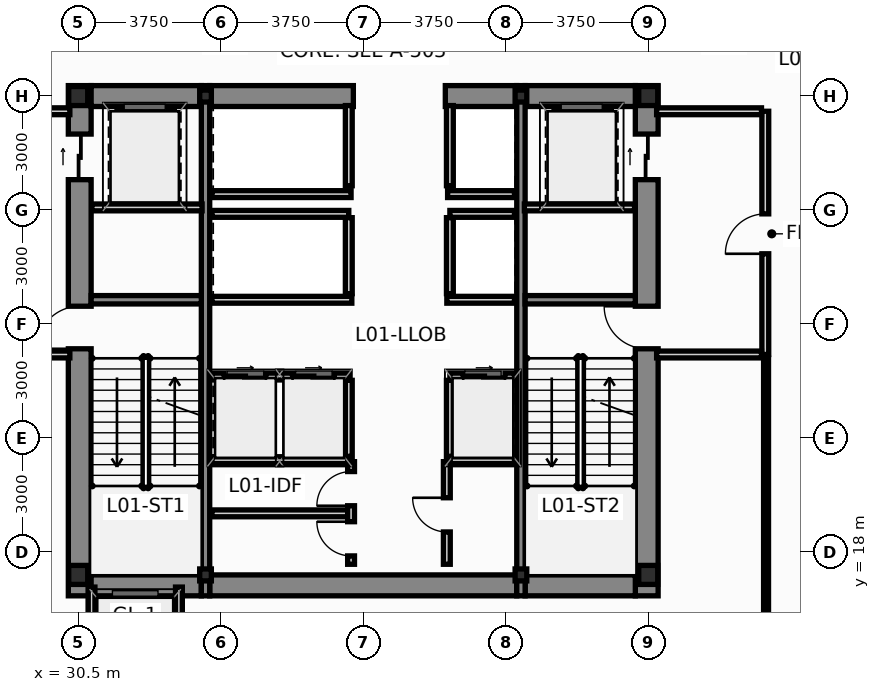
"""IFC4 building model, lengths in metres.
Left out: names, types, materials, properties, quantities, classifications, styles, units other than length and angle.
Written with IfcOpenShell. Run it as: python <this file> out.ifc"""

import sys

from ifc_helpers import new_model, si_unit, direction, frame, frame_2d, origin, origin_2d, place, context, subcontext, project, spatial, rectangle, i_section, extrude, source, transform, mapped, element, fill, save


model = new_model("IFC4")
c1 = context("Model", 3, precision=1e-05, world=origin(), true_north=direction((0.0, 1.0)))
c2 = subcontext(c1, "Body", "Model", "MODEL_VIEW")
j1 = project(units=[si_unit("LENGTHUNIT", "METRE"), si_unit("PLANEANGLEUNIT", "RADIAN")], contexts=[c1])
p1 = place(None, origin())
s1 = spatial("IfcSite", under=j1, at=p1, CompositionType="ELEMENT")
p2 = place(p1, origin())
s2 = spatial("IfcBuilding", under=s1, at=p2, CompositionType="ELEMENT")
p3 = place(p2, frame((0.0, 0.0, 5.4)))
s3 = spatial("IfcBuildingStorey", under=s2, at=p3, CompositionType="ELEMENT", Elevation=5.4)
m1 = source(origin(), c2, "Body", "SweptSolid", [
    extrude(i_section(OverallWidth=0.5, OverallDepth=0.5, WebThickness=0.028, FlangeThickness=0.04, at=origin_2d()), origin(), (0.0, 0.0, 1.0), 4.8),
])
for number, where, z_axis, x_axis in (
    (1, (30.5, 17.4, 0.0), (0.0, 0.0, 1.0), (1.0, 0.0, 0.0)),
    (2, (45.5, 17.4, 0.0), (0.0, 0.0, 1.0), (1.0, 0.0, 0.0)),
    (3, (45.5, 30.0, 0.0), (0.0, 0.0, 1.0), (1.0, 0.0, 0.0)),
    (4, (30.5, 30.0, 0.0), (0.0, 0.0, 1.0), (1.0, 0.0, 0.0)),
):
    element("IfcColumn", number, at=place(p3, frame(where, z_axis=z_axis, x_axis=x_axis)), inside=s3, PredefinedType="COLUMN", context=c2, shape_type="MappedRepresentation", body=[
        mapped(m1, transform((0.0, 0.0, 0.0), scale=1.0)),
    ])
m2 = source(origin(), c2, "Body", "SweptSolid", [
    extrude(i_section(OverallWidth=0.307, OverallDepth=0.315, WebThickness=0.012, FlangeThickness=0.019, at=origin_2d()), origin(), (0.0, 0.0, 1.0), 4.8),
])
for number, where, z_axis, x_axis in (
    (5, (33.85, 17.4, 0.0), (0.0, 0.0, 1.0), (1.0, 0.0, 0.0)),
    (6, (42.15, 17.4, 0.0), (0.0, 0.0, 1.0), (1.0, 0.0, 0.0)),
    (7, (33.85, 30.0, 0.0), (0.0, 0.0, 1.0), (1.0, 0.0, 0.0)),
    (8, (42.15, 30.0, 0.0), (0.0, 0.0, 1.0), (1.0, 0.0, 0.0)),
):
    element("IfcColumn", number, at=place(p3, frame(where, z_axis=z_axis, x_axis=x_axis)), inside=s3, PredefinedType="COLUMN", context=c2, shape_type="MappedRepresentation", body=[
        mapped(m2, transform((0.0, 0.0, 0.0), scale=1.0)),
    ])
p4 = place(p3, frame((30.54, 16.85, 0.0), z_axis=(0.0, 0.0, 1.0), x_axis=(0.0, 1.0, 0.0)))
e9 = element("IfcWall", 9, at=p4, inside=s3, PredefinedType="SHEAR", context=c2, shape_type="SweptSolid", body=[
    extrude(rectangle(XDim=13.425, YDim=0.6, at=frame_2d((6.712, 0.0))), origin(), (0.0, 0.0, 1.0), 4.8),
])
p5 = place(p4, frame((6.5, 0.0, 0.0)))
e10 = element("IfcOpeningElement", 10, at=p5, cuts=e9, PredefinedType="OPENING", context=c2, shape_type="SweptSolid", body=[
    extrude(rectangle(XDim=1.12, YDim=2.15, at=frame_2d((0.56, 1.075))), frame((0.0, 0.312, 0.0), z_axis=(0.0, -1.0, 0.0), x_axis=(1.0, 0.0, 0.0)), (0.0, 0.0, 1.0), 0.624),
])
p6 = place(p4, frame((10.95, 0.0, 0.0)))
e11 = element("IfcOpeningElement", 11, at=p6, cuts=e9, PredefinedType="OPENING", context=c2, shape_type="SweptSolid", body=[
    extrude(rectangle(XDim=1.2, YDim=2.2, at=frame_2d((0.6, 1.1))), frame((0.0, 0.312, 0.0), z_axis=(0.0, -1.0, 0.0), x_axis=(1.0, 0.0, 0.0)), (0.0, 0.0, 1.0), 0.624),
])
p7 = place(p3, frame((45.46, 16.85, 0.0), z_axis=(0.0, 0.0, 1.0), x_axis=(0.0, 1.0, 0.0)))
e12 = element("IfcWall", 12, at=p7, inside=s3, PredefinedType="SHEAR", context=c2, shape_type="SweptSolid", body=[
    extrude(rectangle(XDim=13.425, YDim=0.6, at=frame_2d((6.712, 0.0))), origin(), (0.0, 0.0, 1.0), 4.8),
])
p8 = place(p7, frame((6.5, 0.0, 0.0)))
e13 = element("IfcOpeningElement", 13, at=p8, cuts=e12, PredefinedType="OPENING", context=c2, shape_type="SweptSolid", body=[
    extrude(rectangle(XDim=1.12, YDim=2.15, at=frame_2d((0.56, 1.075))), frame((0.0, 0.312, 0.0), z_axis=(0.0, -1.0, 0.0), x_axis=(1.0, 0.0, 0.0)), (0.0, 0.0, 1.0), 0.624),
])
p9 = place(p7, frame((10.95, 0.0, 0.0)))
e14 = element("IfcOpeningElement", 14, at=p9, cuts=e12, PredefinedType="OPENING", context=c2, shape_type="SweptSolid", body=[
    extrude(rectangle(XDim=1.2, YDim=2.2, at=frame_2d((0.6, 1.1))), frame((0.0, 0.312, 0.0), z_axis=(0.0, -1.0, 0.0), x_axis=(1.0, 0.0, 0.0)), (0.0, 0.0, 1.0), 0.624),
])
p10 = place(p3, frame((30.84, 17.125, 0.0), z_axis=(0.0, 0.0, 1.0), x_axis=(1.0, 0.0, 0.0)))
e15 = element("IfcWall", 15, at=p10, inside=s3, PredefinedType="SHEAR", context=c2, shape_type="SweptSolid", body=[
    extrude(rectangle(XDim=2.9, YDim=0.55, at=frame_2d((1.45, 0.0))), origin(), (0.0, 0.0, 1.0), 4.8),
])
p11 = place(p3, frame((33.96, 17.125, 0.0), z_axis=(0.0, 0.0, 1.0), x_axis=(1.0, 0.0, 0.0)))
e16 = element("IfcWall", 16, at=p11, inside=s3, PredefinedType="SHEAR", context=c2, shape_type="SweptSolid", body=[
    extrude(rectangle(XDim=8.08, YDim=0.55, at=frame_2d((4.04, 0.0))), origin(), (0.0, 0.0, 1.0), 4.8),
])
for number, where, z_axis, x_axis in (
    (17, (42.26, 17.125, 0.0), (0.0, 0.0, 1.0), (1.0, 0.0, 0.0)),
    (18, (30.84, 30.0, 0.0), (0.0, 0.0, 1.0), (1.0, 0.0, 0.0)),
):
    element("IfcWall", number, at=place(p3, frame(where, z_axis=z_axis, x_axis=x_axis)), inside=s3, PredefinedType="SHEAR", context=c2, shape_type="SweptSolid", body=[
        extrude(rectangle(XDim=2.9, YDim=0.55, at=frame_2d((1.45, 0.0))), origin(), (0.0, 0.0, 1.0), 4.8),
    ])
p12 = place(p3, frame((33.96, 30.0, 0.0), z_axis=(0.0, 0.0, 1.0), x_axis=(1.0, 0.0, 0.0)))
e19 = element("IfcWall", 19, at=p12, inside=s3, PredefinedType="SHEAR", context=c2, shape_type="SweptSolid", body=[
    extrude(rectangle(XDim=3.78, YDim=0.55, at=frame_2d((1.89, 0.0))), origin(), (0.0, 0.0, 1.0), 4.8),
])
p13 = place(p3, frame((40.16, 30.0, 0.0), z_axis=(0.0, 0.0, 1.0), x_axis=(1.0, 0.0, 0.0)))
e20 = element("IfcWall", 20, at=p13, inside=s3, PredefinedType="SHEAR", context=c2, shape_type="SweptSolid", body=[
    extrude(rectangle(XDim=1.88, YDim=0.55, at=frame_2d((0.94, 0.0))), origin(), (0.0, 0.0, 1.0), 4.8),
])
p14 = place(p3, frame((42.26, 30.0, 0.0), z_axis=(0.0, 0.0, 1.0), x_axis=(1.0, 0.0, 0.0)))
e21 = element("IfcWall", 21, at=p14, inside=s3, PredefinedType="SHEAR", context=c2, shape_type="SweptSolid", body=[
    extrude(rectangle(XDim=2.9, YDim=0.55, at=frame_2d((1.45, 0.0))), origin(), (0.0, 0.0, 1.0), 4.8),
])
for number, where, z_axis, x_axis in (
    (22, (33.85, 16.85, 0.0), (0.0, 0.0, 1.0), (0.0, 1.0, 0.0)),
    (23, (42.15, 16.85, 0.0), (0.0, 0.0, 1.0), (0.0, 1.0, 0.0)),
):
    element("IfcWall", number, at=place(p3, frame(where, z_axis=z_axis, x_axis=x_axis)), inside=s3, PredefinedType="SHEAR", context=c2, shape_type="SweptSolid", body=[
        extrude(rectangle(XDim=13.425, YDim=0.22, at=frame_2d((6.712, 0.0))), origin(), (0.0, 0.0, 1.0), 4.8),
    ])
for number, where, z_axis, x_axis in (
    (24, (30.84, 24.64, 0.0), (0.0, 0.0, 1.0), (1.0, 0.0, 0.0)),
    (25, (42.26, 24.64, 0.0), (0.0, 0.0, 1.0), (1.0, 0.0, 0.0)),
):
    element("IfcWall", number, at=place(p3, frame(where, z_axis=z_axis, x_axis=x_axis)), inside=s3, PredefinedType="SHEAR", context=c2, shape_type="SweptSolid", body=[
        extrude(rectangle(XDim=2.9, YDim=0.22, at=frame_2d((1.45, 0.0))), origin(), (0.0, 0.0, 1.0), 4.8),
    ])
p15 = place(p3, frame((30.85, 14.42, 0.0), z_axis=(0.0, 0.0, 1.0), x_axis=(0.0, 1.0, 0.0)))
e26 = element("IfcWall", 26, at=p15, inside=s3, PredefinedType="PARTITIONING", context=c2, shape_type="SweptSolid", body=[
    extrude(rectangle(XDim=2.66, YDim=0.18, at=frame_2d((1.33, 0.0))), origin(), (0.0, 0.0, 1.0), 3.854),
])
p16 = place(p3, frame((33.15, 14.42, 0.0), z_axis=(0.0, 0.0, 1.0), x_axis=(0.0, 1.0, 0.0)))
e27 = element("IfcWall", 27, at=p16, inside=s3, PredefinedType="PARTITIONING", context=c2, shape_type="SweptSolid", body=[
    extrude(rectangle(XDim=2.66, YDim=0.18, at=frame_2d((1.33, 0.0))), origin(), (0.0, 0.0, 1.0), 4.48),
])
p17 = place(p3, frame((34.02, 22.62, 0.0), z_axis=(0.0, 0.0, 1.0), x_axis=(1.0, 0.0, 0.0)))
e28 = element("IfcWall", 28, at=p17, inside=s3, PredefinedType="PARTITIONING", context=c2, shape_type="SweptSolid", body=[
    extrude(rectangle(XDim=3.6, YDim=0.18, at=frame_2d((1.8, 0.0))), origin(), (0.0, 0.0, 1.0), 4.48),
])
p18 = place(p17, frame((0.32, 0.0, 0.0)))
e29 = element("IfcOpeningElement", 29, at=p18, cuts=e28, PredefinedType="OPENING", context=c2, shape_type="SweptSolid", body=[
    extrude(rectangle(XDim=1.1, YDim=2.2, at=frame_2d((0.55, 1.1))), frame((0.0, 0.102, 0.0), z_axis=(0.0, -1.0, 0.0), x_axis=(1.0, 0.0, 0.0)), (0.0, 0.0, 1.0), 0.204),
])
p19 = place(p17, frame((2.12, 0.0, 0.0)))
e30 = element("IfcOpeningElement", 30, at=p19, cuts=e28, PredefinedType="OPENING", context=c2, shape_type="SweptSolid", body=[
    extrude(rectangle(XDim=1.1, YDim=2.2, at=frame_2d((0.55, 1.1))), frame((0.0, 0.102, 0.0), z_axis=(0.0, -1.0, 0.0), x_axis=(1.0, 0.0, 0.0)), (0.0, 0.0, 1.0), 0.204),
])
p20 = place(p3, frame((40.28, 22.62, 0.0), z_axis=(0.0, 0.0, 1.0), x_axis=(1.0, 0.0, 0.0)))
e31 = element("IfcWall", 31, at=p20, inside=s3, PredefinedType="PARTITIONING", context=c2, shape_type="SweptSolid", body=[
    extrude(rectangle(XDim=1.7, YDim=0.18, at=frame_2d((0.85, 0.0))), origin(), (0.0, 0.0, 1.0), 4.48),
])
p21 = place(p20, frame((0.35, 0.0, 0.0)))
e32 = element("IfcOpeningElement", 32, at=p21, cuts=e31, PredefinedType="OPENING", context=c2, shape_type="SweptSolid", body=[
    extrude(rectangle(XDim=1.1, YDim=2.2, at=frame_2d((0.55, 1.1))), frame((0.0, 0.102, 0.0), z_axis=(0.0, -1.0, 0.0), x_axis=(1.0, 0.0, 0.0)), (0.0, 0.0, 1.0), 0.204),
])
for number, where, z_axis, x_axis in (
    (33, (37.62, 20.52, 0.0), (0.0, 0.0, 1.0), (0.0, 1.0, 0.0)),
    (34, (40.28, 20.52, 0.0), (0.0, 0.0, 1.0), (0.0, 1.0, 0.0)),
):
    element("IfcWall", number, at=place(p3, frame(where, z_axis=z_axis, x_axis=x_axis)), inside=s3, PredefinedType="PARTITIONING", context=c2, shape_type="SweptSolid", body=[
        extrude(rectangle(XDim=2.0, YDim=0.18, at=frame_2d((1.0, 0.0))), origin(), (0.0, 0.0, 1.0), 4.48),
    ])
p22 = place(p3, frame((34.02, 26.9, 0.0), z_axis=(0.0, 0.0, 1.0), x_axis=(1.0, 0.0, 0.0)))
e35 = element("IfcWall", 35, at=p22, inside=s3, PredefinedType="PARTITIONING", context=c2, shape_type="SweptSolid", body=[
    extrude(rectangle(XDim=3.6, YDim=0.18, at=frame_2d((1.8, 0.0))), origin(), (0.0, 0.0, 1.0), 4.48),
])
p23 = place(p3, frame((40.28, 26.9, 0.0), z_axis=(0.0, 0.0, 1.0), x_axis=(1.0, 0.0, 0.0)))
e36 = element("IfcWall", 36, at=p23, inside=s3, PredefinedType="PARTITIONING", context=c2, shape_type="SweptSolid", body=[
    extrude(rectangle(XDim=1.7, YDim=0.18, at=frame_2d((0.85, 0.0))), origin(), (0.0, 0.0, 1.0), 4.48),
])
for number, where, z_axis, x_axis in (
    (37, (37.62, 24.8, 0.0), (0.0, 0.0, 1.0), (0.0, 1.0, 0.0)),
    (38, (40.28, 24.8, 0.0), (0.0, 0.0, 1.0), (0.0, 1.0, 0.0)),
):
    element("IfcWall", number, at=place(p3, frame(where, z_axis=z_axis, x_axis=x_axis)), inside=s3, PredefinedType="PARTITIONING", context=c2, shape_type="SweptSolid", body=[
        extrude(rectangle(XDim=2.0, YDim=0.18, at=frame_2d((1.0, 0.0))), origin(), (0.0, 0.0, 1.0), 4.48),
    ])
p24 = place(p3, frame((34.02, 24.64, 0.0), z_axis=(0.0, 0.0, 1.0), x_axis=(1.0, 0.0, 0.0)))
e39 = element("IfcWall", 39, at=p24, inside=s3, PredefinedType="PARTITIONING", context=c2, shape_type="SweptSolid", body=[
    extrude(rectangle(XDim=3.68, YDim=0.18, at=frame_2d((1.84, 0.0))), origin(), (0.0, 0.0, 1.0), 4.48),
])
p25 = place(p3, frame((40.2, 24.64, 0.0), z_axis=(0.0, 0.0, 1.0), x_axis=(1.0, 0.0, 0.0)))
e40 = element("IfcWall", 40, at=p25, inside=s3, PredefinedType="PARTITIONING", context=c2, shape_type="SweptSolid", body=[
    extrude(rectangle(XDim=1.78, YDim=0.18, at=frame_2d((0.89, 0.0))), origin(), (0.0, 0.0, 1.0), 4.48),
])
p26 = place(p3, frame((34.02, 27.42, 0.0), z_axis=(0.0, 0.0, 1.0), x_axis=(1.0, 0.0, 0.0)))
e41 = element("IfcWall", 41, at=p26, inside=s3, PredefinedType="PARTITIONING", context=c2, shape_type="SweptSolid", body=[
    extrude(rectangle(XDim=3.66, YDim=0.18, at=frame_2d((1.83, 0.0))), origin(), (0.0, 0.0, 1.0), 4.48),
])
p27 = place(p3, frame((40.22, 27.42, 0.0), z_axis=(0.0, 0.0, 1.0), x_axis=(1.0, 0.0, 0.0)))
e42 = element("IfcWall", 42, at=p27, inside=s3, PredefinedType="PARTITIONING", context=c2, shape_type="SweptSolid", body=[
    extrude(rectangle(XDim=1.76, YDim=0.18, at=frame_2d((0.88, 0.0))), origin(), (0.0, 0.0, 1.0), 4.48),
])
for number, where, z_axis, x_axis in (
    (43, (37.62, 27.64, 0.0), (0.0, 0.0, 1.0), (0.0, 1.0, 0.0)),
    (44, (40.28, 27.64, 0.0), (0.0, 0.0, 1.0), (0.0, 1.0, 0.0)),
):
    element("IfcWall", number, at=place(p3, frame(where, z_axis=z_axis, x_axis=x_axis)), inside=s3, PredefinedType="PARTITIONING", context=c2, shape_type="SweptSolid", body=[
        extrude(rectangle(XDim=2.11, YDim=0.18, at=frame_2d((1.055, 0.0))), origin(), (0.0, 0.0, 1.0), 4.48),
    ])
p28 = place(p3, frame((27.52, 23.2, 0.0), z_axis=(0.0, 0.0, 1.0), x_axis=(1.0, 0.0, 0.0)))
e45 = element("IfcWall", 45, at=p28, inside=s3, PredefinedType="PARTITIONING", context=c2, shape_type="SweptSolid", body=[
    extrude(rectangle(XDim=2.76, YDim=0.18, at=frame_2d((1.38, 0.0))), origin(), (0.0, 0.0, 1.0), 4.48),
])
p29 = place(p3, frame((27.52, 29.6, 0.0), z_axis=(0.0, 0.0, 1.0), x_axis=(1.0, 0.0, 0.0)))
e46 = element("IfcWall", 46, at=p29, inside=s3, PredefinedType="PARTITIONING", context=c2, shape_type="SweptSolid", body=[
    extrude(rectangle(XDim=2.76, YDim=0.18, at=frame_2d((1.38, 0.0))), origin(), (0.0, 0.0, 1.0), 3.854),
])
p30 = place(p3, frame((48.58, 23.2, 0.0), z_axis=(0.0, 0.0, 1.0), x_axis=(0.0, 1.0, 0.0)))
e47 = element("IfcWall", 47, at=p30, inside=s3, PredefinedType="PARTITIONING", context=c2, shape_type="SweptSolid", body=[
    extrude(rectangle(XDim=6.4, YDim=0.18, at=frame_2d((3.2, 0.0))), origin(), (0.0, 0.0, 1.0), 4.48),
])
p31 = place(p30, frame((2.65, 0.0, 0.0)))
e48 = element("IfcOpeningElement", 48, at=p31, cuts=e47, PredefinedType="OPENING", context=c2, shape_type="SweptSolid", body=[
    extrude(rectangle(XDim=1.05, YDim=2.15, at=frame_2d((0.525, 1.075))), frame((0.0, 0.102, 0.0), z_axis=(0.0, -1.0, 0.0), x_axis=(1.0, 0.0, 0.0)), (0.0, 0.0, 1.0), 0.204),
])
p32 = place(p3, frame((45.72, 23.2, 0.0), z_axis=(0.0, 0.0, 1.0), x_axis=(1.0, 0.0, 0.0)))
e49 = element("IfcWall", 49, at=p32, inside=s3, PredefinedType="PARTITIONING", context=c2, shape_type="SweptSolid", body=[
    extrude(rectangle(XDim=2.76, YDim=0.18, at=frame_2d((1.38, 0.0))), origin(), (0.0, 0.0, 1.0), 4.48),
])
p33 = place(p3, frame((45.72, 29.6, 0.0), z_axis=(0.0, 0.0, 1.0), x_axis=(1.0, 0.0, 0.0)))
e50 = element("IfcWall", 50, at=p33, inside=s3, PredefinedType="PARTITIONING", context=c2, shape_type="SweptSolid", body=[
    extrude(rectangle(XDim=2.76, YDim=0.18, at=frame_2d((1.38, 0.0))), origin(), (0.0, 0.0, 1.0), 3.854),
])
for number, where, z_axis, x_axis in (
    (51, (30.86, 27.07, 0.0), (0.0, 0.0, 1.0), (1.0, 0.0, 0.0)),
    (52, (42.24, 27.07, 0.0), (0.0, 0.0, 1.0), (1.0, 0.0, 0.0)),
):
    element("IfcWall", number, at=place(p3, frame(where, z_axis=z_axis, x_axis=x_axis)), inside=s3, PredefinedType="PARTITIONING", context=c2, shape_type="SweptSolid", body=[
        extrude(rectangle(XDim=2.9, YDim=0.18, at=frame_2d((1.45, 0.0))), origin(), (0.0, 0.0, 1.0), 4.48),
    ])
p34 = place(p3, frame((34.02, 20.42, 0.0), z_axis=(0.0, 0.0, 1.0), x_axis=(1.0, 0.0, 0.0)))
e53 = element("IfcWall", 53, at=p34, inside=s3, PredefinedType="PARTITIONING", context=c2, shape_type="SweptSolid", body=[
    extrude(rectangle(XDim=3.64, YDim=0.18, at=frame_2d((1.82, 0.0))), origin(), (0.0, 0.0, 1.0), 4.48),
])
p35 = place(p3, frame((40.22, 20.42, 0.0), z_axis=(0.0, 0.0, 1.0), x_axis=(1.0, 0.0, 0.0)))
e54 = element("IfcWall", 54, at=p35, inside=s3, PredefinedType="PARTITIONING", context=c2, shape_type="SweptSolid", body=[
    extrude(rectangle(XDim=1.76, YDim=0.18, at=frame_2d((0.88, 0.0))), origin(), (0.0, 0.0, 1.0), 4.48),
])
p36 = place(p3, frame((34.02, 19.02, 0.0), z_axis=(0.0, 0.0, 1.0), x_axis=(1.0, 0.0, 0.0)))
e55 = element("IfcWall", 55, at=p36, inside=s3, PredefinedType="PARTITIONING", context=c2, shape_type="SweptSolid", body=[
    extrude(rectangle(XDim=3.58, YDim=0.18, at=frame_2d((1.79, 0.0))), origin(), (0.0, 0.0, 1.0), 4.48),
])
p37 = place(p3, frame((37.68, 17.68, 0.0), z_axis=(0.0, 0.0, 1.0), x_axis=(0.0, 1.0, 0.0)))
e56 = element("IfcWall", 56, at=p37, inside=s3, PredefinedType="PARTITIONING", context=c2, shape_type="SweptSolid", body=[
    extrude(rectangle(XDim=2.7, YDim=0.18, at=frame_2d((1.35, 0.0))), origin(), (0.0, 0.0, 1.0), 4.48),
])
p38 = place(p37, frame((0.22, 0.0, 0.0)))
e57 = element("IfcOpeningElement", 57, at=p38, cuts=e56, PredefinedType="OPENING", context=c2, shape_type="SweptSolid", body=[
    extrude(rectangle(XDim=0.9, YDim=2.1, at=frame_2d((0.45, 1.05))), frame((0.0, 0.102, 0.0), z_axis=(0.0, -1.0, 0.0), x_axis=(1.0, 0.0, 0.0)), (0.0, 0.0, 1.0), 0.204),
])
p39 = place(p37, frame((1.54, 0.0, 0.0)))
e58 = element("IfcOpeningElement", 58, at=p39, cuts=e56, PredefinedType="OPENING", context=c2, shape_type="SweptSolid", body=[
    extrude(rectangle(XDim=0.9, YDim=2.1, at=frame_2d((0.45, 1.05))), frame((0.0, 0.102, 0.0), z_axis=(0.0, -1.0, 0.0), x_axis=(1.0, 0.0, 0.0)), (0.0, 0.0, 1.0), 0.204),
])
p40 = place(p3, frame((40.2, 17.68, 0.0), z_axis=(0.0, 0.0, 1.0), x_axis=(0.0, 1.0, 0.0)))
e59 = element("IfcWall", 59, at=p40, inside=s3, PredefinedType="PARTITIONING", context=c2, shape_type="SweptSolid", body=[
    extrude(rectangle(XDim=2.7, YDim=0.18, at=frame_2d((1.35, 0.0))), origin(), (0.0, 0.0, 1.0), 4.48),
])
p41 = place(p40, frame((0.85, 0.0, 0.0)))
e60 = element("IfcOpeningElement", 60, at=p41, cuts=e59, PredefinedType="OPENING", context=c2, shape_type="SweptSolid", body=[
    extrude(rectangle(XDim=0.9, YDim=2.1, at=frame_2d((0.45, 1.05))), frame((0.0, 0.102, 0.0), z_axis=(0.0, -1.0, 0.0), x_axis=(1.0, 0.0, 0.0)), (0.0, 0.0, 1.0), 0.204),
])
p42 = place(p3, frame((48.6, 14.355, 0.0), z_axis=(0.0, 0.0, 1.0), x_axis=(0.0, 1.0, 0.0)))
e61 = element("IfcWall", 61, at=p42, inside=s3, PredefinedType="PARTITIONING", context=c2, shape_type="SweptSolid", body=[
    extrude(rectangle(XDim=8.75, YDim=0.13, at=frame_2d((4.375, 0.0))), origin(), (0.0, 0.0, 1.0), 4.48),
])
p43 = place(p5, origin())
e62 = element("IfcDoor", 62, at=p43, inside=s3, OperationType="SINGLE_SWING_LEFT", PredefinedType="DOOR", context=c2, shape_type="SweptSolid", body=[
    extrude(rectangle(XDim=1.12, YDim=2.15, at=frame_2d((0.56, 1.075))), frame((0.0, 0.025, 0.0), z_axis=(0.0, -1.0, 0.0), x_axis=(1.0, 0.0, 0.0)), (0.0, 0.0, 1.0), 0.05),
])
fill(e10, e62)
p44 = place(p6, origin())
e63 = element("IfcDoor", 63, at=p44, inside=s3, OperationType="SLIDING_TO_LEFT", PredefinedType="DOOR", context=c2, shape_type="SweptSolid", body=[
    extrude(rectangle(XDim=1.2, YDim=2.2, at=frame_2d((0.6, 1.1))), frame((0.0, 0.025, 0.0), z_axis=(0.0, -1.0, 0.0), x_axis=(1.0, 0.0, 0.0)), (0.0, 0.0, 1.0), 0.05),
])
fill(e11, e63)
p45 = place(p8, origin())
e64 = element("IfcDoor", 64, at=p45, inside=s3, OperationType="SINGLE_SWING_RIGHT", PredefinedType="DOOR", context=c2, shape_type="SweptSolid", body=[
    extrude(rectangle(XDim=1.12, YDim=2.15, at=frame_2d((0.56, 1.075))), frame((0.0, 0.025, 0.0), z_axis=(0.0, -1.0, 0.0), x_axis=(1.0, 0.0, 0.0)), (0.0, 0.0, 1.0), 0.05),
])
fill(e13, e64)
p46 = place(p9, origin())
e65 = element("IfcDoor", 65, at=p46, inside=s3, OperationType="SLIDING_TO_RIGHT", PredefinedType="DOOR", context=c2, shape_type="SweptSolid", body=[
    extrude(rectangle(XDim=1.2, YDim=2.2, at=frame_2d((0.6, 1.1))), frame((0.0, 0.025, 0.0), z_axis=(0.0, -1.0, 0.0), x_axis=(1.0, 0.0, 0.0)), (0.0, 0.0, 1.0), 0.05),
])
fill(e14, e65)
p47 = place(p18, origin())
e66 = element("IfcDoor", 66, at=p47, inside=s3, OperationType="SLIDING_TO_LEFT", PredefinedType="DOOR", context=c2, shape_type="SweptSolid", body=[
    extrude(rectangle(XDim=1.1, YDim=2.2, at=frame_2d((0.55, 1.1))), frame((0.0, 0.025, 0.0), z_axis=(0.0, -1.0, 0.0), x_axis=(1.0, 0.0, 0.0)), (0.0, 0.0, 1.0), 0.05),
])
fill(e29, e66)
p48 = place(p19, origin())
e67 = element("IfcDoor", 67, at=p48, inside=s3, OperationType="SLIDING_TO_RIGHT", PredefinedType="DOOR", context=c2, shape_type="SweptSolid", body=[
    extrude(rectangle(XDim=1.1, YDim=2.2, at=frame_2d((0.55, 1.1))), frame((0.0, 0.025, 0.0), z_axis=(0.0, -1.0, 0.0), x_axis=(1.0, 0.0, 0.0)), (0.0, 0.0, 1.0), 0.05),
])
fill(e30, e67)
p49 = place(p21, origin())
e68 = element("IfcDoor", 68, at=p49, inside=s3, OperationType="SLIDING_TO_LEFT", PredefinedType="DOOR", context=c2, shape_type="SweptSolid", body=[
    extrude(rectangle(XDim=1.1, YDim=2.2, at=frame_2d((0.55, 1.1))), frame((0.0, 0.025, 0.0), z_axis=(0.0, -1.0, 0.0), x_axis=(1.0, 0.0, 0.0)), (0.0, 0.0, 1.0), 0.05),
])
fill(e32, e68)
p50 = place(p31, origin())
e69 = element("IfcDoor", 69, at=p50, inside=s3, OperationType="SINGLE_SWING_LEFT", PredefinedType="DOOR", context=c2, shape_type="SweptSolid", body=[
    extrude(rectangle(XDim=1.05, YDim=2.15, at=frame_2d((0.525, 1.075))), frame((0.0, 0.025, 0.0), z_axis=(0.0, -1.0, 0.0), x_axis=(1.0, 0.0, 0.0)), (0.0, 0.0, 1.0), 0.05),
])
fill(e48, e69)
p51 = place(p38, origin())
e70 = element("IfcDoor", 70, at=p51, inside=s3, OperationType="SINGLE_SWING_RIGHT", PredefinedType="DOOR", context=c2, shape_type="SweptSolid", body=[
    extrude(rectangle(XDim=0.9, YDim=2.1, at=frame_2d((0.45, 1.05))), frame((0.0, 0.025, 0.0), z_axis=(0.0, -1.0, 0.0), x_axis=(1.0, 0.0, 0.0)), (0.0, 0.0, 1.0), 0.05),
])
fill(e57, e70)
p52 = place(p39, origin())
e71 = element("IfcDoor", 71, at=p52, inside=s3, OperationType="SINGLE_SWING_LEFT", PredefinedType="DOOR", context=c2, shape_type="SweptSolid", body=[
    extrude(rectangle(XDim=0.9, YDim=2.1, at=frame_2d((0.45, 1.05))), frame((0.0, 0.025, 0.0), z_axis=(0.0, -1.0, 0.0), x_axis=(1.0, 0.0, 0.0)), (0.0, 0.0, 1.0), 0.05),
])
fill(e58, e71)
p53 = place(p41, origin())
e72 = element("IfcDoor", 72, at=p53, inside=s3, OperationType="SINGLE_SWING_RIGHT", PredefinedType="DOOR", context=c2, shape_type="SweptSolid", body=[
    extrude(rectangle(XDim=0.9, YDim=2.1, at=frame_2d((0.45, 1.05))), frame((0.0, 0.025, 0.0), z_axis=(0.0, -1.0, 0.0), x_axis=(1.0, 0.0, 0.0)), (0.0, 0.0, 1.0), 0.05),
])
fill(e60, e72)
save(model, sys.argv[1])
